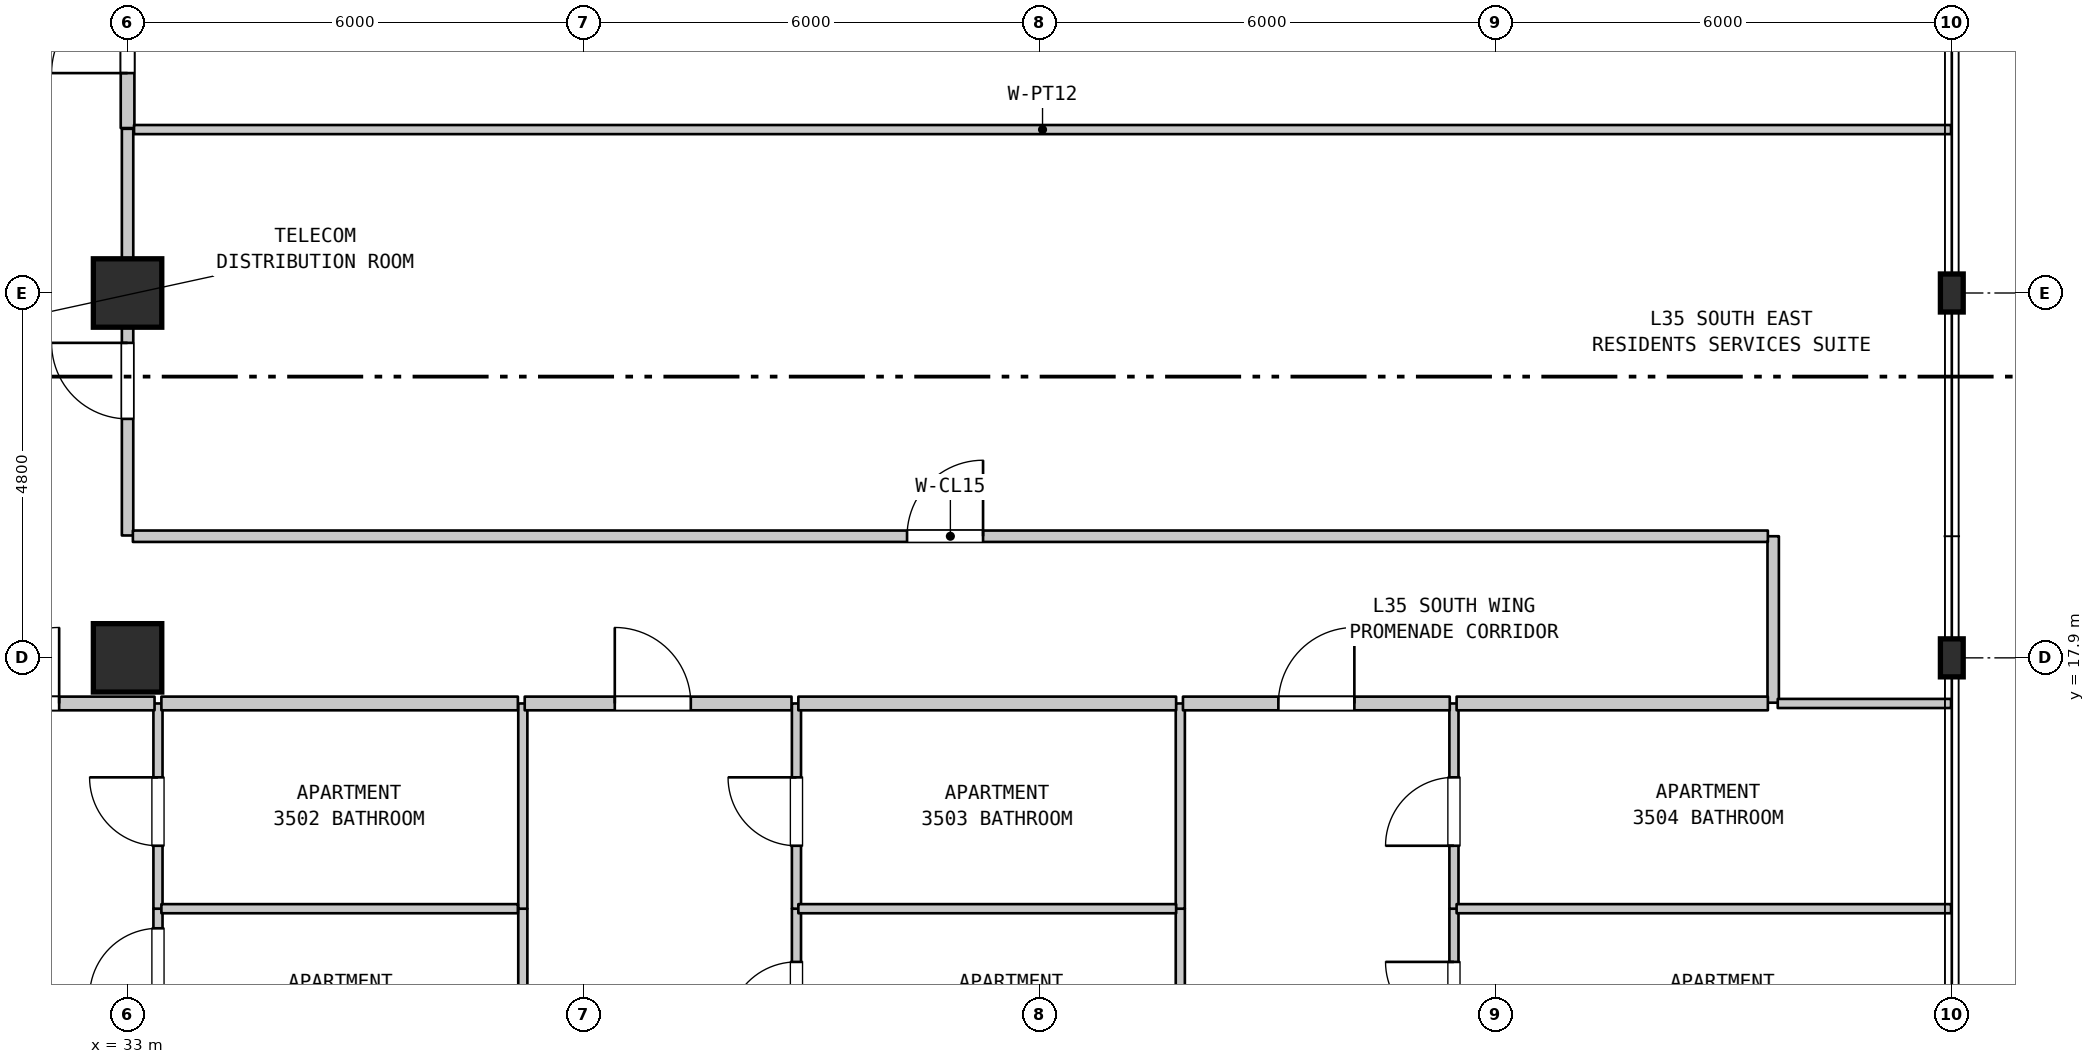
"""IFC4 building model, lengths in metres.
Left out: names, types, materials, properties, quantities, classifications, styles, units other than length and angle.
Written with IfcOpenShell. Run it as: python <this file> out.ifc"""

import sys

from ifc_helpers import new_model, si_unit, direction, frame, frame_2d, origin, origin_2d, place, context, subcontext, project, spatial, rectangle, i_section, extrude, element, fill, save


model = new_model("IFC4")
c1 = context("Model", 3, precision=1e-05, world=origin(), true_north=direction((0.0, 1.0)))
c2 = subcontext(c1, "Body", "Model", "MODEL_VIEW")
j1 = project(units=[si_unit("LENGTHUNIT", "METRE"), si_unit("PLANEANGLEUNIT", "RADIAN")], contexts=[c1])
p1 = place(None, origin())
s1 = spatial("IfcSite", under=j1, at=p1, CompositionType="ELEMENT")
p2 = place(p1, origin())
s2 = spatial("IfcBuilding", under=s1, at=p2, CompositionType="ELEMENT")
p3 = place(p2, frame((0.0, 0.0, 144.6)))
s3 = spatial("IfcBuildingStorey", under=s2, at=p3, CompositionType="ELEMENT", Elevation=144.6)
for number, where, z_axis, x_axis in (
    (1, (33.0, 17.9, 0.0), (0.0, 0.0, 1.0), (1.0, 0.0, 0.0)),
    (2, (33.0, 22.7, 0.0), (0.0, 0.0, 1.0), (1.0, 0.0, 0.0)),
):
    element("IfcColumn", number, at=place(p3, frame(where, z_axis=z_axis, x_axis=x_axis)), inside=s3, PredefinedType="COLUMN", context=c2, shape_type="SweptSolid", body=[
        extrude(rectangle(XDim=0.9, YDim=0.9, at=origin_2d()), origin(), (0.0, 0.0, 1.0), 3.7),
    ])
for number, where, z_axis, x_axis in (
    (3, (57.0, 17.9, 0.0), (0.0, 0.0, 1.0), (1.0, 0.0, 0.0)),
    (4, (57.0, 22.7, 0.0), (0.0, 0.0, 1.0), (1.0, 0.0, 0.0)),
):
    element("IfcColumn", number, at=place(p3, frame(where, z_axis=z_axis, x_axis=x_axis)), inside=s3, PredefinedType="COLUMN", context=c2, shape_type="SweptSolid", body=[
        extrude(i_section(OverallWidth=0.3, OverallDepth=0.5, WebThickness=0.014, FlangeThickness=0.028, FilletRadius=0.027, at=origin_2d()), origin(), (0.0, 0.0, 1.0), 3.7),
    ])
p4 = place(p3, frame((33.0, 19.51, 0.0), z_axis=(0.0, 0.0, 1.0), x_axis=(0.0, 1.0, 0.0)))
e5 = element("IfcWall", 5, at=p4, inside=s3, PredefinedType="STANDARD", context=c2, shape_type="SweptSolid", body=[
    extrude(rectangle(XDim=5.35, YDim=0.15, at=frame_2d((2.675, 0.0))), origin(), (0.0, 0.0, 1.0), 2.935),
])
p5 = place(p4, frame((1.534, 0.0, 0.0)))
e6 = element("IfcOpeningElement", 6, at=p5, cuts=e5, PredefinedType="OPENING", context=c2, shape_type="SweptSolid", body=[
    extrude(rectangle(XDim=1.0, YDim=2.15, at=frame_2d((0.5, 1.075))), frame((0.0, 0.085, 0.0), z_axis=(0.0, -1.0, 0.0), x_axis=(1.0, 0.0, 0.0)), (0.0, 0.0, 1.0), 0.17),
])
p6 = place(p3, frame((33.0, 24.87, 0.0), z_axis=(0.0, 0.0, 1.0), x_axis=(0.0, 1.0, 0.0)))
e7 = element("IfcWall", 7, at=p6, inside=s3, PredefinedType="STANDARD", context=c2, shape_type="SweptSolid", body=[
    extrude(rectangle(XDim=2.6, YDim=0.18, at=frame_2d((1.3, 0.0))), origin(), (0.0, 0.0, 1.0), 2.935),
])
p7 = place(p6, frame((0.723, 0.0, 0.0)))
e8 = element("IfcOpeningElement", 8, at=p7, cuts=e7, PredefinedType="OPENING", context=c2, shape_type="SweptSolid", body=[
    extrude(rectangle(XDim=1.0, YDim=2.15, at=frame_2d((0.5, 1.075))), frame((0.0, 0.1, 0.0), z_axis=(0.0, -1.0, 0.0), x_axis=(1.0, 0.0, 0.0)), (0.0, 0.0, 1.0), 0.2),
])
p8 = place(p3, frame((33.4, 12.3, 0.0), z_axis=(0.0, 0.0, 1.0), x_axis=(0.0, 1.0, 0.0)))
e9 = element("IfcWall", 9, at=p8, inside=s3, PredefinedType="PARTITIONING", context=c2, shape_type="SweptSolid", body=[
    extrude(rectangle(XDim=2.3, YDim=0.12, at=frame_2d((1.15, 0.0))), origin(), (0.0, 0.0, 1.0), 3.385),
])
p9 = place(p8, frame((1.142, 0.0, 0.0)))
e10 = element("IfcOpeningElement", 10, at=p9, cuts=e9, PredefinedType="OPENING", context=c2, shape_type="SweptSolid", body=[
    extrude(rectangle(XDim=0.9, YDim=2.15, at=frame_2d((0.45, 1.075))), frame((0.0, 0.07, 0.0), z_axis=(0.0, -1.0, 0.0), x_axis=(1.0, 0.0, 0.0)), (0.0, 0.0, 1.0), 0.14),
])
p10 = place(p3, frame((33.4, 14.6, 0.0), z_axis=(0.0, 0.0, 1.0), x_axis=(0.0, 1.0, 0.0)))
e11 = element("IfcWall", 11, at=p10, inside=s3, PredefinedType="PARTITIONING", context=c2, shape_type="SweptSolid", body=[
    extrude(rectangle(XDim=2.7, YDim=0.12, at=frame_2d((1.35, 0.0))), origin(), (0.0, 0.0, 1.0), 3.385),
])
p11 = place(p10, frame((0.828, 0.0, 0.0)))
e12 = element("IfcOpeningElement", 12, at=p11, cuts=e11, PredefinedType="OPENING", context=c2, shape_type="SweptSolid", body=[
    extrude(rectangle(XDim=0.9, YDim=2.1, at=frame_2d((0.45, 1.05))), frame((0.0, 0.07, 0.0), z_axis=(0.0, -1.0, 0.0), x_axis=(1.0, 0.0, 0.0)), (0.0, 0.0, 1.0), 0.14),
])
p12 = place(p3, frame((38.2, 12.3, 0.0), z_axis=(0.0, 0.0, 1.0), x_axis=(0.0, 1.0, 0.0)))
e13 = element("IfcWall", 13, at=p12, inside=s3, PredefinedType="PARTITIONING", context=c2, shape_type="SweptSolid", body=[
    extrude(rectangle(XDim=2.3, YDim=0.12, at=frame_2d((1.15, 0.0))), origin(), (0.0, 0.0, 1.0), 3.385),
])
p13 = place(p3, frame((38.2, 14.6, 0.0), z_axis=(0.0, 0.0, 1.0), x_axis=(0.0, 1.0, 0.0)))
e14 = element("IfcWall", 14, at=p13, inside=s3, PredefinedType="PARTITIONING", context=c2, shape_type="SweptSolid", body=[
    extrude(rectangle(XDim=2.7, YDim=0.12, at=frame_2d((1.35, 0.0))), origin(), (0.0, 0.0, 1.0), 3.385),
])
p14 = place(p3, frame((41.8, 12.3, 0.0), z_axis=(0.0, 0.0, 1.0), x_axis=(0.0, 1.0, 0.0)))
e15 = element("IfcWall", 15, at=p14, inside=s3, PredefinedType="PARTITIONING", context=c2, shape_type="SweptSolid", body=[
    extrude(rectangle(XDim=2.3, YDim=0.12, at=frame_2d((1.15, 0.0))), origin(), (0.0, 0.0, 1.0), 3.385),
])
p15 = place(p14, frame((0.7, 0.0, 0.0)))
e16 = element("IfcOpeningElement", 16, at=p15, cuts=e15, PredefinedType="OPENING", context=c2, shape_type="SweptSolid", body=[
    extrude(rectangle(XDim=0.9, YDim=2.15, at=frame_2d((0.45, 1.075))), frame((0.0, 0.07, 0.0), z_axis=(0.0, -1.0, 0.0), x_axis=(1.0, 0.0, 0.0)), (0.0, 0.0, 1.0), 0.14),
])
p16 = place(p3, frame((41.8, 14.6, 0.0), z_axis=(0.0, 0.0, 1.0), x_axis=(0.0, 1.0, 0.0)))
e17 = element("IfcWall", 17, at=p16, inside=s3, PredefinedType="PARTITIONING", context=c2, shape_type="SweptSolid", body=[
    extrude(rectangle(XDim=2.7, YDim=0.12, at=frame_2d((1.35, 0.0))), origin(), (0.0, 0.0, 1.0), 3.385),
])
p17 = place(p16, frame((0.828, 0.0, 0.0)))
e18 = element("IfcOpeningElement", 18, at=p17, cuts=e17, PredefinedType="OPENING", context=c2, shape_type="SweptSolid", body=[
    extrude(rectangle(XDim=0.9, YDim=2.1, at=frame_2d((0.45, 1.05))), frame((0.0, 0.07, 0.0), z_axis=(0.0, -1.0, 0.0), x_axis=(1.0, 0.0, 0.0)), (0.0, 0.0, 1.0), 0.14),
])
p18 = place(p3, frame((46.85, 12.3, 0.0), z_axis=(0.0, 0.0, 1.0), x_axis=(0.0, 1.0, 0.0)))
e19 = element("IfcWall", 19, at=p18, inside=s3, PredefinedType="PARTITIONING", context=c2, shape_type="SweptSolid", body=[
    extrude(rectangle(XDim=2.3, YDim=0.12, at=frame_2d((1.15, 0.0))), origin(), (0.0, 0.0, 1.0), 3.385),
])
p19 = place(p3, frame((46.85, 14.6, 0.0), z_axis=(0.0, 0.0, 1.0), x_axis=(0.0, 1.0, 0.0)))
e20 = element("IfcWall", 20, at=p19, inside=s3, PredefinedType="PARTITIONING", context=c2, shape_type="SweptSolid", body=[
    extrude(rectangle(XDim=2.7, YDim=0.12, at=frame_2d((1.35, 0.0))), origin(), (0.0, 0.0, 1.0), 3.385),
])
p20 = place(p3, frame((50.45, 12.3, 0.0), z_axis=(0.0, 0.0, 1.0), x_axis=(0.0, 1.0, 0.0)))
e21 = element("IfcWall", 21, at=p20, inside=s3, PredefinedType="PARTITIONING", context=c2, shape_type="SweptSolid", body=[
    extrude(rectangle(XDim=2.3, YDim=0.12, at=frame_2d((1.15, 0.0))), origin(), (0.0, 0.0, 1.0), 3.385),
])
p21 = place(p20, frame((0.7, 0.0, 0.0)))
e22 = element("IfcOpeningElement", 22, at=p21, cuts=e21, PredefinedType="OPENING", context=c2, shape_type="SweptSolid", body=[
    extrude(rectangle(XDim=0.9, YDim=2.15, at=frame_2d((0.45, 1.075))), frame((0.0, 0.07, 0.0), z_axis=(0.0, -1.0, 0.0), x_axis=(1.0, 0.0, 0.0)), (0.0, 0.0, 1.0), 0.14),
])
p22 = place(p3, frame((50.45, 14.6, 0.0), z_axis=(0.0, 0.0, 1.0), x_axis=(0.0, 1.0, 0.0)))
e23 = element("IfcWall", 23, at=p22, inside=s3, PredefinedType="PARTITIONING", context=c2, shape_type="SweptSolid", body=[
    extrude(rectangle(XDim=2.7, YDim=0.12, at=frame_2d((1.35, 0.0))), origin(), (0.0, 0.0, 1.0), 3.385),
])
p23 = place(p22, frame((0.828, 0.0, 0.0)))
e24 = element("IfcOpeningElement", 24, at=p23, cuts=e23, PredefinedType="OPENING", context=c2, shape_type="SweptSolid", body=[
    extrude(rectangle(XDim=0.9, YDim=2.1, at=frame_2d((0.45, 1.05))), frame((0.0, 0.07, 0.0), z_axis=(0.0, -1.0, 0.0), x_axis=(1.0, 0.0, 0.0)), (0.0, 0.0, 1.0), 0.14),
])
p24 = place(p3, frame((54.65, 17.31, 0.0), z_axis=(0.0, 0.0, 1.0), x_axis=(0.0, 1.0, 0.0)))
e25 = element("IfcWall", 25, at=p24, inside=s3, PredefinedType="STANDARD", context=c2, shape_type="SweptSolid", body=[
    extrude(rectangle(XDim=2.19, YDim=0.15, at=frame_2d((1.095, 0.0))), origin(), (0.0, 0.0, 1.0), 3.385),
])
p25 = place(p3, frame((33.445, 14.6, 0.0), z_axis=(0.0, 0.0, 1.0), x_axis=(1.0, 0.0, 0.0)))
e26 = element("IfcWall", 26, at=p25, inside=s3, PredefinedType="PARTITIONING", context=c2, shape_type="SweptSolid", body=[
    extrude(rectangle(XDim=4.69, YDim=0.12, at=frame_2d((2.345, 0.0))), origin(), (0.0, 0.0, 1.0), 3.385),
])
p26 = place(p3, frame((41.825, 14.6, 0.0), z_axis=(0.0, 0.0, 1.0), x_axis=(1.0, 0.0, 0.0)))
e27 = element("IfcWall", 27, at=p26, inside=s3, PredefinedType="PARTITIONING", context=c2, shape_type="SweptSolid", body=[
    extrude(rectangle(XDim=4.97, YDim=0.12, at=frame_2d((2.485, 0.0))), origin(), (0.0, 0.0, 1.0), 3.385),
])
p27 = place(p3, frame((50.485, 14.6, 0.0), z_axis=(0.0, 0.0, 1.0), x_axis=(1.0, 0.0, 0.0)))
e28 = element("IfcWall", 28, at=p27, inside=s3, PredefinedType="PARTITIONING", context=c2, shape_type="SweptSolid", body=[
    extrude(rectangle(XDim=6.505, YDim=0.12, at=frame_2d((3.252, 0.0))), origin(), (0.0, 0.0, 1.0), 3.385),
])
p28 = place(p3, frame((29.845, 17.3, 0.0), z_axis=(0.0, 0.0, 1.0), x_axis=(1.0, 0.0, 0.0)))
e29 = element("IfcWall", 29, at=p28, inside=s3, PredefinedType="STANDARD", context=c2, shape_type="SweptSolid", body=[
    extrude(rectangle(XDim=3.51, YDim=0.18, at=frame_2d((1.755, 0.0))), origin(), (0.0, 0.0, 1.0), 3.385),
])
p29 = place(p28, frame((1.255, 0.0, 0.0)))
e30 = element("IfcOpeningElement", 30, at=p29, cuts=e29, PredefinedType="OPENING", context=c2, shape_type="SweptSolid", body=[
    extrude(rectangle(XDim=1.0, YDim=2.15, at=frame_2d((0.5, 1.075))), frame((0.0, 0.1, 0.0), z_axis=(0.0, -1.0, 0.0), x_axis=(1.0, 0.0, 0.0)), (0.0, 0.0, 1.0), 0.2),
])
p30 = place(p3, frame((33.445, 17.3, 0.0), z_axis=(0.0, 0.0, 1.0), x_axis=(1.0, 0.0, 0.0)))
e31 = element("IfcWall", 31, at=p30, inside=s3, PredefinedType="STANDARD", context=c2, shape_type="SweptSolid", body=[
    extrude(rectangle(XDim=4.69, YDim=0.18, at=frame_2d((2.345, 0.0))), origin(), (0.0, 0.0, 1.0), 3.385),
])
p31 = place(p3, frame((38.225, 17.3, 0.0), z_axis=(0.0, 0.0, 1.0), x_axis=(1.0, 0.0, 0.0)))
e32 = element("IfcWall", 32, at=p31, inside=s3, PredefinedType="STANDARD", context=c2, shape_type="SweptSolid", body=[
    extrude(rectangle(XDim=3.51, YDim=0.18, at=frame_2d((1.755, 0.0))), origin(), (0.0, 0.0, 1.0), 3.385),
])
p32 = place(p31, frame((1.185, 0.0, 0.0)))
e33 = element("IfcOpeningElement", 33, at=p32, cuts=e32, PredefinedType="OPENING", context=c2, shape_type="SweptSolid", body=[
    extrude(rectangle(XDim=1.0, YDim=2.15, at=frame_2d((0.5, 1.075))), frame((0.0, 0.1, 0.0), z_axis=(0.0, -1.0, 0.0), x_axis=(1.0, 0.0, 0.0)), (0.0, 0.0, 1.0), 0.2),
])
p33 = place(p3, frame((41.825, 17.3, 0.0), z_axis=(0.0, 0.0, 1.0), x_axis=(1.0, 0.0, 0.0)))
e34 = element("IfcWall", 34, at=p33, inside=s3, PredefinedType="STANDARD", context=c2, shape_type="SweptSolid", body=[
    extrude(rectangle(XDim=4.97, YDim=0.18, at=frame_2d((2.485, 0.0))), origin(), (0.0, 0.0, 1.0), 3.385),
])
p34 = place(p3, frame((46.885, 17.3, 0.0), z_axis=(0.0, 0.0, 1.0), x_axis=(1.0, 0.0, 0.0)))
e35 = element("IfcWall", 35, at=p34, inside=s3, PredefinedType="STANDARD", context=c2, shape_type="SweptSolid", body=[
    extrude(rectangle(XDim=3.51, YDim=0.18, at=frame_2d((1.755, 0.0))), origin(), (0.0, 0.0, 1.0), 3.385),
])
p35 = place(p34, frame((1.255, 0.0, 0.0)))
e36 = element("IfcOpeningElement", 36, at=p35, cuts=e35, PredefinedType="OPENING", context=c2, shape_type="SweptSolid", body=[
    extrude(rectangle(XDim=1.0, YDim=2.15, at=frame_2d((0.5, 1.075))), frame((0.0, 0.1, 0.0), z_axis=(0.0, -1.0, 0.0), x_axis=(1.0, 0.0, 0.0)), (0.0, 0.0, 1.0), 0.2),
])
p36 = place(p3, frame((50.485, 17.3, 0.0), z_axis=(0.0, 0.0, 1.0), x_axis=(1.0, 0.0, 0.0)))
e37 = element("IfcWall", 37, at=p36, inside=s3, PredefinedType="STANDARD", context=c2, shape_type="SweptSolid", body=[
    extrude(rectangle(XDim=4.095, YDim=0.18, at=frame_2d((2.047, 0.0))), origin(), (0.0, 0.0, 1.0), 3.385),
])
p37 = place(p3, frame((54.71, 17.3, 0.0), z_axis=(0.0, 0.0, 1.0), x_axis=(1.0, 0.0, 0.0)))
e38 = element("IfcWall", 38, at=p37, inside=s3, PredefinedType="PARTITIONING", context=c2, shape_type="SweptSolid", body=[
    extrude(rectangle(XDim=2.28, YDim=0.12, at=frame_2d((1.14, 0.0))), origin(), (0.0, 0.0, 1.0), 3.385),
])
p38 = place(p3, frame((33.07, 19.5, 0.0), z_axis=(0.0, 0.0, 1.0), x_axis=(1.0, 0.0, 0.0)))
e39 = element("IfcWall", 39, at=p38, inside=s3, PredefinedType="STANDARD", context=c2, shape_type="SweptSolid", body=[
    extrude(rectangle(XDim=21.51, YDim=0.15, at=frame_2d((10.755, 0.0))), origin(), (0.0, 0.0, 1.0), 3.385),
])
p39 = place(p38, frame((10.185, 0.0, 0.0)))
e40 = element("IfcOpeningElement", 40, at=p39, cuts=e39, PredefinedType="OPENING", context=c2, shape_type="SweptSolid", body=[
    extrude(rectangle(XDim=1.0, YDim=2.15, at=frame_2d((0.5, 1.075))), frame((0.0, 0.085, 0.0), z_axis=(0.0, -1.0, 0.0), x_axis=(1.0, 0.0, 0.0)), (0.0, 0.0, 1.0), 0.17),
])
p40 = place(p3, frame((33.085, 24.85, 0.0), z_axis=(0.0, 0.0, 1.0), x_axis=(1.0, 0.0, 0.0)))
e41 = element("IfcWall", 41, at=p40, inside=s3, PredefinedType="PARTITIONING", context=c2, shape_type="SweptSolid", body=[
    extrude(rectangle(XDim=23.905, YDim=0.12, at=frame_2d((11.953, 0.0))), origin(), (0.0, 0.0, 1.0), 3.385),
])
p41 = place(p5, origin())
e42 = element("IfcDoor", 42, at=p41, inside=s3, OperationType="SINGLE_SWING_RIGHT", PredefinedType="DOOR", context=c2, shape_type="SweptSolid", body=[
    extrude(rectangle(XDim=1.0, YDim=2.15, at=frame_2d((0.5, 1.075))), frame((0.0, 0.025, 0.0), z_axis=(0.0, -1.0, 0.0), x_axis=(1.0, 0.0, 0.0)), (0.0, 0.0, 1.0), 0.05),
])
fill(e6, e42)
p42 = place(p7, origin())
e43 = element("IfcDoor", 43, at=p42, inside=s3, OperationType="SINGLE_SWING_LEFT", PredefinedType="DOOR", context=c2, shape_type="SweptSolid", body=[
    extrude(rectangle(XDim=1.0, YDim=2.15, at=frame_2d((0.5, 1.075))), frame((0.0, 0.025, 0.0), z_axis=(0.0, -1.0, 0.0), x_axis=(1.0, 0.0, 0.0)), (0.0, 0.0, 1.0), 0.05),
])
fill(e8, e43)
p43 = place(p9, origin())
e44 = element("IfcDoor", 44, at=p43, inside=s3, OperationType="SINGLE_SWING_LEFT", PredefinedType="DOOR", context=c2, shape_type="SweptSolid", body=[
    extrude(rectangle(XDim=0.9, YDim=2.15, at=frame_2d((0.45, 1.075))), frame((0.0, 0.025, 0.0), z_axis=(0.0, -1.0, 0.0), x_axis=(1.0, 0.0, 0.0)), (0.0, 0.0, 1.0), 0.05),
])
fill(e10, e44)
p44 = place(p11, origin())
e45 = element("IfcDoor", 45, at=p44, inside=s3, OperationType="SINGLE_SWING_RIGHT", PredefinedType="DOOR", context=c2, shape_type="SweptSolid", body=[
    extrude(rectangle(XDim=0.9, YDim=2.1, at=frame_2d((0.45, 1.05))), frame((0.0, 0.025, 0.0), z_axis=(0.0, -1.0, 0.0), x_axis=(1.0, 0.0, 0.0)), (0.0, 0.0, 1.0), 0.05),
])
fill(e12, e45)
p45 = place(p15, origin())
e46 = element("IfcDoor", 46, at=p45, inside=s3, OperationType="SINGLE_SWING_LEFT", PredefinedType="DOOR", context=c2, shape_type="SweptSolid", body=[
    extrude(rectangle(XDim=0.9, YDim=2.15, at=frame_2d((0.45, 1.075))), frame((0.0, 0.025, 0.0), z_axis=(0.0, -1.0, 0.0), x_axis=(1.0, 0.0, 0.0)), (0.0, 0.0, 1.0), 0.05),
])
fill(e16, e46)
p46 = place(p17, origin())
e47 = element("IfcDoor", 47, at=p46, inside=s3, OperationType="SINGLE_SWING_RIGHT", PredefinedType="DOOR", context=c2, shape_type="SweptSolid", body=[
    extrude(rectangle(XDim=0.9, YDim=2.1, at=frame_2d((0.45, 1.05))), frame((0.0, 0.025, 0.0), z_axis=(0.0, -1.0, 0.0), x_axis=(1.0, 0.0, 0.0)), (0.0, 0.0, 1.0), 0.05),
])
fill(e18, e47)
p47 = place(p21, origin())
e48 = element("IfcDoor", 48, at=p47, inside=s3, OperationType="SINGLE_SWING_RIGHT", PredefinedType="DOOR", context=c2, shape_type="SweptSolid", body=[
    extrude(rectangle(XDim=0.9, YDim=2.15, at=frame_2d((0.45, 1.075))), frame((0.0, 0.025, 0.0), z_axis=(0.0, -1.0, 0.0), x_axis=(1.0, 0.0, 0.0)), (0.0, 0.0, 1.0), 0.05),
])
fill(e22, e48)
p48 = place(p23, origin())
e49 = element("IfcDoor", 49, at=p48, inside=s3, OperationType="SINGLE_SWING_LEFT", PredefinedType="DOOR", context=c2, shape_type="SweptSolid", body=[
    extrude(rectangle(XDim=0.9, YDim=2.1, at=frame_2d((0.45, 1.05))), frame((0.0, 0.025, 0.0), z_axis=(0.0, -1.0, 0.0), x_axis=(1.0, 0.0, 0.0)), (0.0, 0.0, 1.0), 0.05),
])
fill(e24, e49)
p49 = place(p29, origin())
e50 = element("IfcDoor", 50, at=p49, inside=s3, OperationType="SINGLE_SWING_RIGHT", PredefinedType="DOOR", context=c2, shape_type="SweptSolid", body=[
    extrude(rectangle(XDim=1.0, YDim=2.15, at=frame_2d((0.5, 1.075))), frame((0.0, 0.025, 0.0), z_axis=(0.0, -1.0, 0.0), x_axis=(1.0, 0.0, 0.0)), (0.0, 0.0, 1.0), 0.05),
])
fill(e30, e50)
p50 = place(p32, origin())
e51 = element("IfcDoor", 51, at=p50, inside=s3, OperationType="SINGLE_SWING_LEFT", PredefinedType="DOOR", context=c2, shape_type="SweptSolid", body=[
    extrude(rectangle(XDim=1.0, YDim=2.15, at=frame_2d((0.5, 1.075))), frame((0.0, 0.025, 0.0), z_axis=(0.0, -1.0, 0.0), x_axis=(1.0, 0.0, 0.0)), (0.0, 0.0, 1.0), 0.05),
])
fill(e33, e51)
p51 = place(p35, origin())
e52 = element("IfcDoor", 52, at=p51, inside=s3, OperationType="SINGLE_SWING_RIGHT", PredefinedType="DOOR", context=c2, shape_type="SweptSolid", body=[
    extrude(rectangle(XDim=1.0, YDim=2.15, at=frame_2d((0.5, 1.075))), frame((0.0, 0.025, 0.0), z_axis=(0.0, -1.0, 0.0), x_axis=(1.0, 0.0, 0.0)), (0.0, 0.0, 1.0), 0.05),
])
fill(e36, e52)
p52 = place(p39, origin())
e53 = element("IfcDoor", 53, at=p52, inside=s3, OperationType="SINGLE_SWING_RIGHT", PredefinedType="DOOR", context=c2, shape_type="SweptSolid", body=[
    extrude(rectangle(XDim=1.0, YDim=2.15, at=frame_2d((0.5, 1.075))), frame((0.0, 0.025, 0.0), z_axis=(0.0, -1.0, 0.0), x_axis=(1.0, 0.0, 0.0)), (0.0, 0.0, 1.0), 0.05),
])
fill(e40, e53)
save(model, sys.argv[1])
